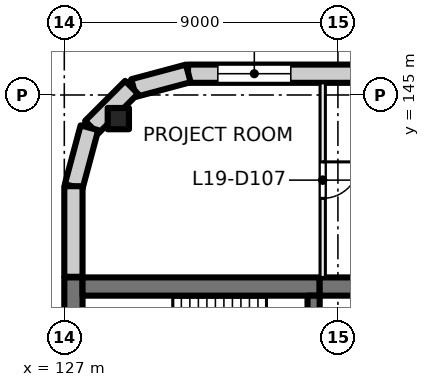
"""IFC4 building model, lengths in metres.
Left out: names, types, materials, properties, quantities, classifications, styles, units other than length and angle.
Written with IfcOpenShell. Run it as: python <this file> out.ifc"""

import sys

from ifc_helpers import new_model, si_unit, direction, frame, frame_2d, origin, origin_2d, place, context, subcontext, project, spatial, rectangle, extrude, element, fill, save


model = new_model("IFC4")
c1 = context("Model", 3, precision=1e-05, world=origin(), true_north=direction((0.0, 1.0)))
c2 = subcontext(c1, "Body", "Model", "MODEL_VIEW")
j1 = project(units=[si_unit("LENGTHUNIT", "METRE"), si_unit("PLANEANGLEUNIT", "RADIAN")], contexts=[c1])
p1 = place(None, origin())
s1 = spatial("IfcSite", under=j1, at=p1, CompositionType="ELEMENT")
p2 = place(p1, origin())
s2 = spatial("IfcBuilding", under=s1, at=p2, CompositionType="ELEMENT")
p3 = place(p2, frame((0.0, 0.0, 85.0)))
s3 = spatial("IfcBuildingStorey", under=s2, at=p3, CompositionType="ELEMENT", Elevation=85.0)
p4 = place(p3, frame((128.777, 144.223, 0.0), z_axis=(0.0, 0.0, 1.0), x_axis=(1.0, 0.0, 0.0)))
e1 = element("IfcColumn", 1, at=p4, inside=s3, PredefinedType="COLUMN", context=c2, shape_type="SweptSolid", body=[
    extrude(rectangle(XDim=0.7, YDim=0.7, at=origin_2d()), origin(), (0.0, 0.0, 1.0), 4.0),
])
p5 = place(p3, frame((127.3, 135.2, 0.0), z_axis=(0.0, 0.0, 1.0), x_axis=(0.0, 1.0, 0.0)))
e2 = element("IfcWall", 2, at=p5, inside=s3, PredefinedType="SHEAR", context=c2, shape_type="SweptSolid", body=[
    extrude(rectangle(XDim=3.8, YDim=0.6, at=frame_2d((1.9, 0.0))), origin(), (0.0, 0.0, 1.0), 4.0),
])
p6 = place(p3, frame((127.6, 138.7, 0.0), z_axis=(0.0, 0.0, 1.0), x_axis=(1.0, 0.0, 0.0)))
e3 = element("IfcWall", 3, at=p6, inside=s3, PredefinedType="SHEAR", context=c2, shape_type="SweptSolid", body=[
    extrude(rectangle(XDim=7.8, YDim=0.6, at=frame_2d((3.9, 0.0))), origin(), (0.0, 0.0, 1.0), 4.0),
])
p7 = place(p3, frame((135.4, 138.7, 0.0), z_axis=(0.0, 0.0, 1.0), x_axis=(1.0, 0.0, 0.0)))
e4 = element("IfcWall", 4, at=p7, inside=s3, PredefinedType="SHEAR", context=c2, shape_type="SweptSolid", body=[
    extrude(rectangle(XDim=4.6, YDim=0.6, at=frame_2d((2.3, 0.0))), origin(), (0.0, 0.0, 1.0), 4.0),
])
p8 = place(p3, frame((135.2, 135.6, 0.0), z_axis=(0.0, 0.0, 1.0), x_axis=(0.0, 1.0, 0.0)))
e5 = element("IfcWall", 5, at=p8, inside=s3, PredefinedType="SHEAR", context=c2, shape_type="SweptSolid", body=[
    extrude(rectangle(XDim=2.8, YDim=0.4, at=frame_2d((1.4, 0.0))), origin(), (0.0, 0.0, 1.0), 4.0),
])
p9 = place(p8, frame((0.9, 0.0, 0.0)))
e6 = element("IfcOpeningElement", 6, at=p9, cuts=e5, PredefinedType="OPENING", context=c2, shape_type="SweptSolid", body=[
    extrude(rectangle(XDim=1.0, YDim=2.1, at=frame_2d((0.5, 1.05))), frame((0.0, 0.21, 0.0), z_axis=(0.0, -1.0, 0.0), x_axis=(1.0, 0.0, 0.0)), (0.0, 0.0, 1.0), 0.42),
])
p10 = place(p3, frame((131.07, 145.7, 0.0), z_axis=(0.0, 0.0, 1.0), x_axis=(1.0, 0.0, 0.0)))
e7 = element("IfcWall", 7, at=p10, inside=s3, PredefinedType="SOLIDWALL", context=c2, shape_type="SweptSolid", body=[
    extrude(rectangle(XDim=31.93, YDim=0.6, at=frame_2d((15.965, 0.0))), origin(), (0.0, 0.0, 1.0), 3.625),
])
p11 = place(p10, frame((0.98, 0.0, 0.9)))
e8 = element("IfcOpeningElement", 8, at=p11, cuts=e7, PredefinedType="OPENING", context=c2, shape_type="SweptSolid", body=[
    extrude(rectangle(XDim=2.4, YDim=2.4, at=frame_2d((1.2, 1.2))), frame((0.0, 0.31, 0.0), z_axis=(0.0, -1.0, 0.0), x_axis=(1.0, 0.0, 0.0)), (0.0, 0.0, 1.0), 0.62),
])
p12 = place(p10, frame((5.48, 0.0, 0.9)))
e9 = element("IfcOpeningElement", 9, at=p12, cuts=e7, PredefinedType="OPENING", context=c2, shape_type="SweptSolid", body=[
    extrude(rectangle(XDim=2.4, YDim=2.4, at=frame_2d((1.2, 1.2))), frame((0.0, 0.31, 0.0), z_axis=(0.0, -1.0, 0.0), x_axis=(1.0, 0.0, 0.0)), (0.0, 0.0, 1.0), 0.62),
])
p13 = place(p10, frame((9.98, 0.0, 0.9)))
e10 = element("IfcOpeningElement", 10, at=p13, cuts=e7, PredefinedType="OPENING", context=c2, shape_type="SweptSolid", body=[
    extrude(rectangle(XDim=2.4, YDim=2.4, at=frame_2d((1.2, 1.2))), frame((0.0, 0.31, 0.0), z_axis=(0.0, -1.0, 0.0), x_axis=(1.0, 0.0, 0.0)), (0.0, 0.0, 1.0), 0.62),
])
p14 = place(p10, frame((14.48, 0.0, 0.9)))
e11 = element("IfcOpeningElement", 11, at=p14, cuts=e7, PredefinedType="OPENING", context=c2, shape_type="SweptSolid", body=[
    extrude(rectangle(XDim=2.4, YDim=2.4, at=frame_2d((1.2, 1.2))), frame((0.0, 0.31, 0.0), z_axis=(0.0, -1.0, 0.0), x_axis=(1.0, 0.0, 0.0)), (0.0, 0.0, 1.0), 0.62),
])
p15 = place(p10, frame((18.98, 0.0, 0.9)))
e12 = element("IfcOpeningElement", 12, at=p15, cuts=e7, PredefinedType="OPENING", context=c2, shape_type="SweptSolid", body=[
    extrude(rectangle(XDim=2.4, YDim=2.4, at=frame_2d((1.2, 1.2))), frame((0.0, 0.31, 0.0), z_axis=(0.0, -1.0, 0.0), x_axis=(1.0, 0.0, 0.0)), (0.0, 0.0, 1.0), 0.62),
])
p16 = place(p10, frame((23.48, 0.0, 0.9)))
e13 = element("IfcOpeningElement", 13, at=p16, cuts=e7, PredefinedType="OPENING", context=c2, shape_type="SweptSolid", body=[
    extrude(rectangle(XDim=2.4, YDim=2.4, at=frame_2d((1.2, 1.2))), frame((0.0, 0.31, 0.0), z_axis=(0.0, -1.0, 0.0), x_axis=(1.0, 0.0, 0.0)), (0.0, 0.0, 1.0), 0.62),
])
p17 = place(p10, frame((27.98, 0.0, 0.9)))
e14 = element("IfcOpeningElement", 14, at=p17, cuts=e7, PredefinedType="OPENING", context=c2, shape_type="SweptSolid", body=[
    extrude(rectangle(XDim=2.4, YDim=2.4, at=frame_2d((1.2, 1.2))), frame((0.0, 0.31, 0.0), z_axis=(0.0, -1.0, 0.0), x_axis=(1.0, 0.0, 0.0)), (0.0, 0.0, 1.0), 0.62),
])
for number, where, z_axis, x_axis in (
    (15, (129.281, 145.229, 0.0), (0.0, 0.0, 1.0), (0.966, 0.259, 0.0)),
    (16, (127.896, 143.936, 0.0), (0.0, 0.0, 1.0), (0.707, 0.707, 0.0)),
):
    element("IfcWall", number, at=place(p3, frame(where, z_axis=z_axis, x_axis=x_axis)), inside=s3, PredefinedType="SOLIDWALL", context=c2, shape_type="SweptSolid", body=[
        extrude(rectangle(XDim=1.861, YDim=0.6, at=frame_2d((0.93, 0.0))), origin(), (0.0, 0.0, 1.0), 3.625),
    ])
p18 = place(p3, frame((127.308, 141.99, 0.0), z_axis=(0.0, 0.0, 1.0), x_axis=(0.258839784042, 0.965920269068, 0.0)))
e17 = element("IfcWall", 17, at=p18, inside=s3, PredefinedType="SOLIDWALL", context=c2, shape_type="SweptSolid", body=[
    extrude(rectangle(XDim=2.0, YDim=0.6, at=frame_2d((1.0, 0.0))), origin(), (0.0, 0.0, 1.0), 3.625),
])
p19 = place(p3, frame((127.3, 139.02, 0.0), z_axis=(0.0, 0.0, 1.0), x_axis=(0.0, 1.0, 0.0)))
e18 = element("IfcWall", 18, at=p19, inside=s3, PredefinedType="SOLIDWALL", context=c2, shape_type="SweptSolid", body=[
    extrude(rectangle(XDim=2.98, YDim=0.6, at=frame_2d((1.49, 0.0))), origin(), (0.0, 0.0, 1.0), 3.625),
])
p20 = place(p3, frame((135.5, 145.4, 0.0), z_axis=(0.0, 0.0, 1.0), x_axis=(0.0, -1.0, 0.0)))
e19 = element("IfcWall", 19, at=p20, inside=s3, PredefinedType="PARTITIONING", context=c2, shape_type="SweptSolid", body=[
    extrude(rectangle(XDim=6.4, YDim=0.175, at=frame_2d((3.2, 0.0))), origin(), (0.0, 0.0, 1.0), 3.625),
])
p21 = place(p20, frame((2.6, 0.0, 0.0)))
e20 = element("IfcOpeningElement", 20, at=p21, cuts=e19, PredefinedType="OPENING", context=c2, shape_type="SweptSolid", body=[
    extrude(rectangle(XDim=1.2, YDim=2.1, at=frame_2d((0.6, 1.05))), frame((0.0, 0.097, 0.0), z_axis=(0.0, -1.0, 0.0), x_axis=(1.0, 0.0, 0.0)), (0.0, 0.0, 1.0), 0.195),
])
p22 = place(p11, origin())
e21 = element("IfcWindow", 21, at=p22, inside=s3, PartitioningType="SINGLE_PANEL", PredefinedType="WINDOW", context=c2, shape_type="SweptSolid", body=[
    extrude(rectangle(XDim=2.4, YDim=2.4, at=frame_2d((1.2, 1.2))), frame((0.0, 0.03, 0.0), z_axis=(0.0, -1.0, 0.0), x_axis=(1.0, 0.0, 0.0)), (0.0, 0.0, 1.0), 0.06),
])
fill(e8, e21)
p23 = place(p21, origin())
e22 = element("IfcDoor", 22, at=p23, inside=s3, OperationType="DOUBLE_DOOR_SINGLE_SWING", PredefinedType="DOOR", context=c2, shape_type="SweptSolid", body=[
    extrude(rectangle(XDim=1.2, YDim=2.1, at=frame_2d((0.6, 1.05))), frame((0.0, 0.025, 0.0), z_axis=(0.0, -1.0, 0.0), x_axis=(1.0, 0.0, 0.0)), (0.0, 0.0, 1.0), 0.05),
])
fill(e20, e22)
save(model, sys.argv[1])
